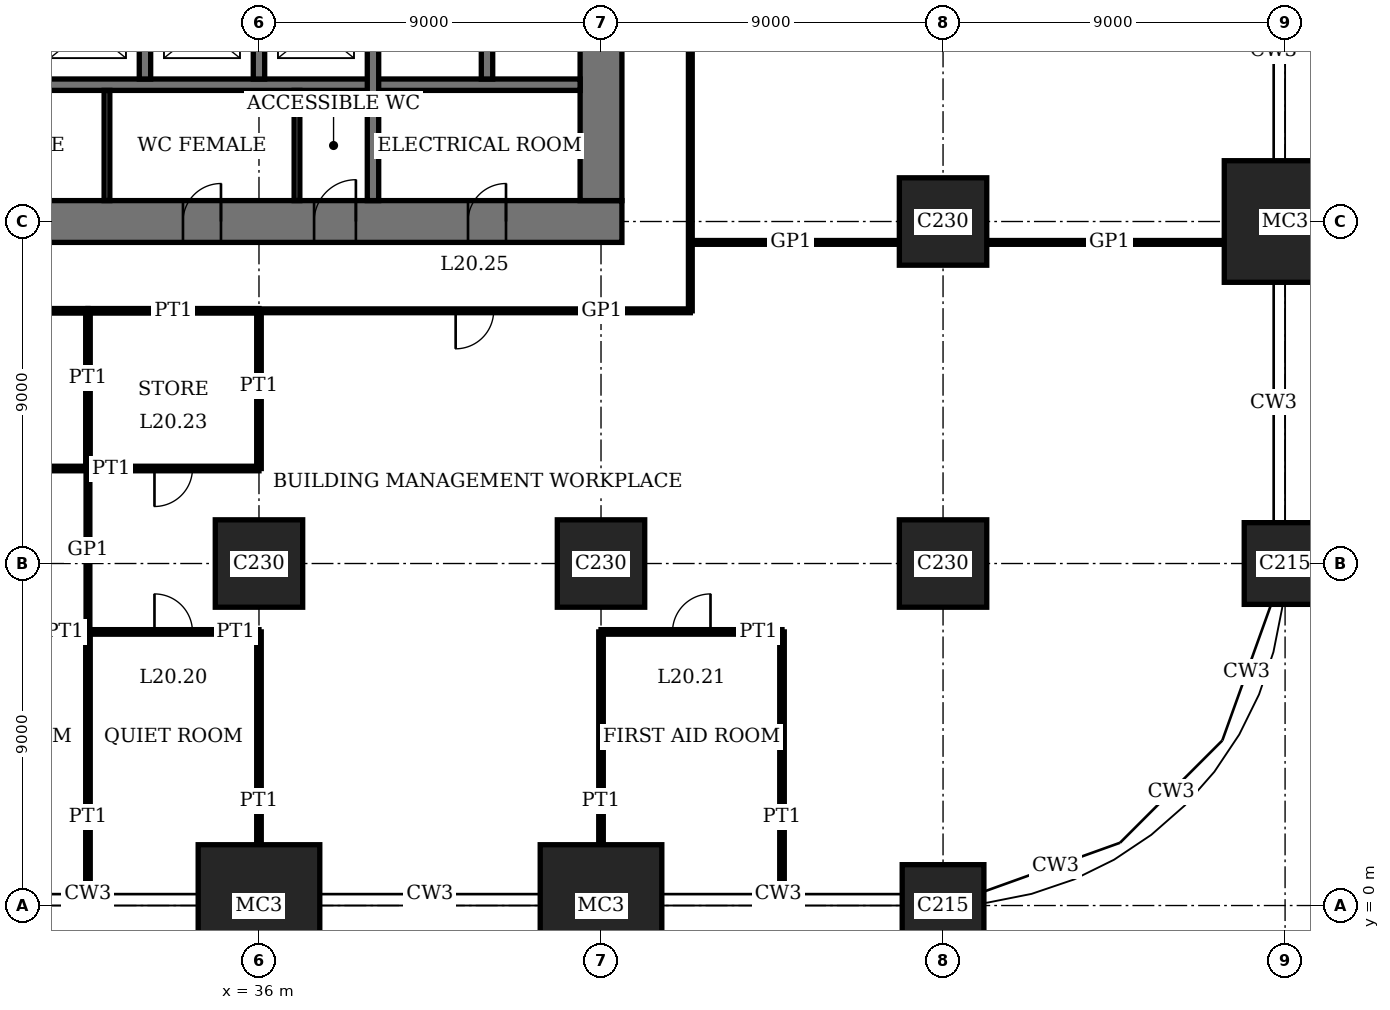
"""IFC4 building model, lengths in metres.
Left out: names, types, materials, properties, quantities, classifications, styles, units other than length and angle.
Written with IfcOpenShell. Run it as: python <this file> out.ifc"""

import sys

from ifc_helpers import new_model, si_unit, direction, frame, frame_2d, origin, origin_2d, place, context, subcontext, project, spatial, rectangle, extrude, element, fill, save


model = new_model("IFC4")
c1 = context("Model", 3, precision=1e-05, world=origin(), true_north=direction((0.0, 1.0)))
c2 = subcontext(c1, "Body", "Model", "MODEL_VIEW")
j1 = project(units=[si_unit("LENGTHUNIT", "METRE"), si_unit("PLANEANGLEUNIT", "RADIAN")], contexts=[c1])
p1 = place(None, origin())
s1 = spatial("IfcSite", under=j1, at=p1, CompositionType="ELEMENT")
p2 = place(p1, origin())
s2 = spatial("IfcBuilding", under=s1, at=p2, CompositionType="ELEMENT")
p3 = place(p2, frame((0.0, 0.0, 85.0)))
s3 = spatial("IfcBuildingStorey", under=s2, at=p3, CompositionType="ELEMENT", Elevation=85.0)
p4 = place(p3, frame((36.0, 0.0, 0.0), z_axis=(0.0, 0.0, 1.0), x_axis=(1.0, 0.0, 0.0)))
e1 = element("IfcColumn", 1, at=p4, inside=s3, PredefinedType="COLUMN", context=c2, shape_type="SweptSolid", body=[
    extrude(rectangle(XDim=3.2, YDim=3.2, at=origin_2d()), origin(), (0.0, 0.0, 1.0), 4.0),
])
p5 = place(p3, frame((36.0, 9.0, 0.0), z_axis=(0.0, 0.0, 1.0), x_axis=(1.0, 0.0, 0.0)))
e2 = element("IfcColumn", 2, at=p5, inside=s3, PredefinedType="COLUMN", context=c2, shape_type="SweptSolid", body=[
    extrude(rectangle(XDim=2.3, YDim=2.3, at=origin_2d()), origin(), (0.0, 0.0, 1.0), 4.0),
])
p6 = place(p3, frame((45.0, 0.0, 0.0), z_axis=(0.0, 0.0, 1.0), x_axis=(1.0, 0.0, 0.0)))
e3 = element("IfcColumn", 3, at=p6, inside=s3, PredefinedType="COLUMN", context=c2, shape_type="SweptSolid", body=[
    extrude(rectangle(XDim=3.2, YDim=3.2, at=origin_2d()), origin(), (0.0, 0.0, 1.0), 4.0),
])
p7 = place(p3, frame((45.0, 9.0, 0.0), z_axis=(0.0, 0.0, 1.0), x_axis=(1.0, 0.0, 0.0)))
e4 = element("IfcColumn", 4, at=p7, inside=s3, PredefinedType="COLUMN", context=c2, shape_type="SweptSolid", body=[
    extrude(rectangle(XDim=2.3, YDim=2.3, at=origin_2d()), origin(), (0.0, 0.0, 1.0), 4.0),
])
p8 = place(p3, frame((54.0, 0.0, 0.0), z_axis=(0.0, 0.0, 1.0), x_axis=(1.0, 0.0, 0.0)))
e5 = element("IfcColumn", 5, at=p8, inside=s3, PredefinedType="COLUMN", context=c2, shape_type="SweptSolid", body=[
    extrude(rectangle(XDim=2.15, YDim=2.15, at=origin_2d()), origin(), (0.0, 0.0, 1.0), 4.0),
])
for number, where, z_axis, x_axis in (
    (6, (54.0, 9.0, 0.0), (0.0, 0.0, 1.0), (1.0, 0.0, 0.0)),
    (7, (54.0, 18.0, 0.0), (0.0, 0.0, 1.0), (1.0, 0.0, 0.0)),
):
    element("IfcColumn", number, at=place(p3, frame(where, z_axis=z_axis, x_axis=x_axis)), inside=s3, PredefinedType="COLUMN", context=c2, shape_type="SweptSolid", body=[
        extrude(rectangle(XDim=2.3, YDim=2.3, at=origin_2d()), origin(), (0.0, 0.0, 1.0), 4.0),
    ])
p9 = place(p3, frame((63.0, 9.0, 0.0), z_axis=(0.0, 0.0, 1.0), x_axis=(1.0, 0.0, 0.0)))
e8 = element("IfcColumn", 8, at=p9, inside=s3, PredefinedType="COLUMN", context=c2, shape_type="SweptSolid", body=[
    extrude(rectangle(XDim=2.15, YDim=2.15, at=origin_2d()), origin(), (0.0, 0.0, 1.0), 4.0),
])
p10 = place(p3, frame((63.0, 18.0, 0.0), z_axis=(0.0, 0.0, 1.0), x_axis=(1.0, 0.0, 0.0)))
e9 = element("IfcColumn", 9, at=p10, inside=s3, PredefinedType="COLUMN", context=c2, shape_type="SweptSolid", body=[
    extrude(rectangle(XDim=3.2, YDim=3.2, at=origin_2d()), origin(), (0.0, 0.0, 1.0), 4.0),
])
p11 = place(p3, frame((17.45, 18.0, 0.0), z_axis=(0.0, 0.0, 1.0), x_axis=(1.0, 0.0, 0.0)))
e10 = element("IfcWall", 10, at=p11, inside=s3, PredefinedType="SHEAR", context=c2, shape_type="SweptSolid", body=[
    extrude(rectangle(XDim=28.1, YDim=1.1, at=frame_2d((14.05, 0.0))), origin(), (0.0, 0.0, 1.0), 4.0),
])
p12 = place(p11, frame((11.55, 0.0, 0.0)))
e11 = element("IfcOpeningElement", 11, at=p12, cuts=e10, PredefinedType="OPENING", context=c2, shape_type="SweptSolid", body=[
    extrude(rectangle(XDim=1.0, YDim=2.4, at=frame_2d((0.5, 1.2))), frame((0.0, 0.56, 0.0), z_axis=(0.0, -1.0, 0.0), x_axis=(1.0, 0.0, 0.0)), (0.0, 0.0, 1.0), 1.12),
])
p13 = place(p11, frame((16.55, 0.0, 0.0)))
e12 = element("IfcOpeningElement", 12, at=p13, cuts=e10, PredefinedType="OPENING", context=c2, shape_type="SweptSolid", body=[
    extrude(rectangle(XDim=1.0, YDim=2.4, at=frame_2d((0.5, 1.2))), frame((0.0, 0.56, 0.0), z_axis=(0.0, -1.0, 0.0), x_axis=(1.0, 0.0, 0.0)), (0.0, 0.0, 1.0), 1.12),
])
p14 = place(p11, frame((20.0, 0.0, 0.0)))
e13 = element("IfcOpeningElement", 13, at=p14, cuts=e10, PredefinedType="OPENING", context=c2, shape_type="SweptSolid", body=[
    extrude(rectangle(XDim=1.1, YDim=2.4, at=frame_2d((0.55, 1.2))), frame((0.0, 0.56, 0.0), z_axis=(0.0, -1.0, 0.0), x_axis=(1.0, 0.0, 0.0)), (0.0, 0.0, 1.0), 1.12),
])
p15 = place(p11, frame((24.05, 0.0, 0.0)))
e14 = element("IfcOpeningElement", 14, at=p15, cuts=e10, PredefinedType="OPENING", context=c2, shape_type="SweptSolid", body=[
    extrude(rectangle(XDim=1.0, YDim=2.4, at=frame_2d((0.5, 1.2))), frame((0.0, 0.56, 0.0), z_axis=(0.0, -1.0, 0.0), x_axis=(1.0, 0.0, 0.0)), (0.0, 0.0, 1.0), 1.12),
])
p16 = place(p3, frame((45.0, 18.55, 0.0), z_axis=(0.0, 0.0, 1.0), x_axis=(0.0, 1.0, 0.0)))
e15 = element("IfcWall", 15, at=p16, inside=s3, PredefinedType="SHEAR", context=c2, shape_type="SweptSolid", body=[
    extrude(rectangle(XDim=16.9, YDim=1.1, at=frame_2d((8.45, 0.0))), origin(), (0.0, 0.0, 1.0), 4.0),
])
p17 = place(p16, frame((8.9, 0.0, 0.0)))
e16 = element("IfcOpeningElement", 16, at=p17, cuts=e15, PredefinedType="OPENING", context=c2, shape_type="SweptSolid", body=[
    extrude(rectangle(XDim=1.8, YDim=2.4, at=frame_2d((0.9, 1.2))), frame((0.0, 0.56, 0.0), z_axis=(0.0, -1.0, 0.0), x_axis=(1.0, 0.0, 0.0)), (0.0, 0.0, 1.0), 1.12),
])
p18 = place(p3, frame((27.15, 21.6, 0.0), z_axis=(0.0, 0.0, 1.0), x_axis=(1.0, 0.0, 0.0)))
e17 = element("IfcWall", 17, at=p18, inside=s3, PredefinedType="SHEAR", context=c2, shape_type="SweptSolid", body=[
    extrude(rectangle(XDim=17.3, YDim=0.3, at=frame_2d((8.65, 0.0))), origin(), (0.0, 0.0, 1.0), 4.0),
])
for number, where, z_axis, x_axis in (
    (18, (33.0, 21.75, 0.0), (0.0, 0.0, 1.0), (0.0, 1.0, 0.0)),
    (19, (36.0, 21.75, 0.0), (0.0, 0.0, 1.0), (0.0, 1.0, 0.0)),
):
    element("IfcWall", number, at=place(p3, frame(where, z_axis=z_axis, x_axis=x_axis)), inside=s3, PredefinedType="SHEAR", context=c2, shape_type="SweptSolid", body=[
        extrude(rectangle(XDim=2.7, YDim=0.3, at=frame_2d((1.35, 0.0))), origin(), (0.0, 0.0, 1.0), 4.0),
    ])
p19 = place(p3, frame((39.0, 18.55, 0.0), z_axis=(0.0, 0.0, 1.0), x_axis=(0.0, 1.0, 0.0)))
e20 = element("IfcWall", 20, at=p19, inside=s3, PredefinedType="SHEAR", context=c2, shape_type="SweptSolid", body=[
    extrude(rectangle(XDim=5.9, YDim=0.3, at=frame_2d((2.95, 0.0))), origin(), (0.0, 0.0, 1.0), 4.0),
])
p20 = place(p3, frame((42.0, 21.75, 0.0), z_axis=(0.0, 0.0, 1.0), x_axis=(0.0, 1.0, 0.0)))
e21 = element("IfcWall", 21, at=p20, inside=s3, PredefinedType="SHEAR", context=c2, shape_type="SweptSolid", body=[
    extrude(rectangle(XDim=2.7, YDim=0.3, at=frame_2d((1.35, 0.0))), origin(), (0.0, 0.0, 1.0), 4.0),
])
p21 = place(p3, frame((27.0, 7.2, 0.0), z_axis=(0.0, 0.0, 1.0), x_axis=(1.0, 0.0, 0.0)))
e22 = element("IfcWall", 22, at=p21, inside=s3, PredefinedType="PARTITIONING", context=c2, shape_type="SweptSolid", body=[
    extrude(rectangle(XDim=4.5, YDim=0.12, at=frame_2d((2.25, 0.0))), origin(), (0.0, 0.0, 1.0), 3.75),
])
p22 = place(p21, frame((1.75, 0.0, 0.0)))
e23 = element("IfcOpeningElement", 23, at=p22, cuts=e22, PredefinedType="OPENING", context=c2, shape_type="SweptSolid", body=[
    extrude(rectangle(XDim=1.0, YDim=2.4, at=frame_2d((0.5, 1.2))), frame((0.0, 0.07, 0.0), z_axis=(0.0, -1.0, 0.0), x_axis=(1.0, 0.0, 0.0)), (0.0, 0.0, 1.0), 0.14),
])
p23 = place(p3, frame((31.5, 7.2, 0.0), z_axis=(0.0, 0.0, 1.0), x_axis=(1.0, 0.0, 0.0)))
e24 = element("IfcWall", 24, at=p23, inside=s3, PredefinedType="PARTITIONING", context=c2, shape_type="SweptSolid", body=[
    extrude(rectangle(XDim=4.5, YDim=0.12, at=frame_2d((2.25, 0.0))), origin(), (0.0, 0.0, 1.0), 3.75),
])
p24 = place(p23, frame((1.75, 0.0, 0.0)))
e25 = element("IfcOpeningElement", 25, at=p24, cuts=e24, PredefinedType="OPENING", context=c2, shape_type="SweptSolid", body=[
    extrude(rectangle(XDim=1.0, YDim=2.4, at=frame_2d((0.5, 1.2))), frame((0.0, 0.07, 0.0), z_axis=(0.0, -1.0, 0.0), x_axis=(1.0, 0.0, 0.0)), (0.0, 0.0, 1.0), 0.14),
])
p25 = place(p3, frame((45.0, 7.2, 0.0), z_axis=(0.0, 0.0, 1.0), x_axis=(1.0, 0.0, 0.0)))
e26 = element("IfcWall", 26, at=p25, inside=s3, PredefinedType="PARTITIONING", context=c2, shape_type="SweptSolid", body=[
    extrude(rectangle(XDim=4.762, YDim=0.12, at=frame_2d((2.381, 0.0))), origin(), (0.0, 0.0, 1.0), 3.75),
])
p26 = place(p25, frame((1.881, 0.0, 0.0)))
e27 = element("IfcOpeningElement", 27, at=p26, cuts=e26, PredefinedType="OPENING", context=c2, shape_type="SweptSolid", body=[
    extrude(rectangle(XDim=1.0, YDim=2.4, at=frame_2d((0.5, 1.2))), frame((0.0, 0.07, 0.0), z_axis=(0.0, -1.0, 0.0), x_axis=(1.0, 0.0, 0.0)), (0.0, 0.0, 1.0), 0.14),
])
p27 = place(p3, frame((22.5, 11.5, 0.0), z_axis=(0.0, 0.0, 1.0), x_axis=(1.0, 0.0, 0.0)))
e28 = element("IfcWall", 28, at=p27, inside=s3, PredefinedType="PARTITIONING", context=c2, shape_type="SweptSolid", body=[
    extrude(rectangle(XDim=9.0, YDim=0.12, at=frame_2d((4.5, 0.0))), origin(), (0.0, 0.0, 1.0), 3.75),
])
p28 = place(p27, frame((4.0, 0.0, 0.0)))
e29 = element("IfcOpeningElement", 29, at=p28, cuts=e28, PredefinedType="OPENING", context=c2, shape_type="SweptSolid", body=[
    extrude(rectangle(XDim=1.0, YDim=2.4, at=frame_2d((0.5, 1.2))), frame((0.0, 0.07, 0.0), z_axis=(0.0, -1.0, 0.0), x_axis=(1.0, 0.0, 0.0)), (0.0, 0.0, 1.0), 0.14),
])
p29 = place(p3, frame((31.5, 11.5, 0.0), z_axis=(0.0, 0.0, 1.0), x_axis=(1.0, 0.0, 0.0)))
e30 = element("IfcWall", 30, at=p29, inside=s3, PredefinedType="PARTITIONING", context=c2, shape_type="SweptSolid", body=[
    extrude(rectangle(XDim=4.5, YDim=0.12, at=frame_2d((2.25, 0.0))), origin(), (0.0, 0.0, 1.0), 3.75),
])
p30 = place(p29, frame((1.75, 0.0, 0.0)))
e31 = element("IfcOpeningElement", 31, at=p30, cuts=e30, PredefinedType="OPENING", context=c2, shape_type="SweptSolid", body=[
    extrude(rectangle(XDim=1.0, YDim=2.4, at=frame_2d((0.5, 1.2))), frame((0.0, 0.07, 0.0), z_axis=(0.0, -1.0, 0.0), x_axis=(1.0, 0.0, 0.0)), (0.0, 0.0, 1.0), 0.14),
])
p31 = place(p3, frame((22.5, 15.65, 0.0), z_axis=(0.0, 0.0, 1.0), x_axis=(1.0, 0.0, 0.0)))
e32 = element("IfcWall", 32, at=p31, inside=s3, PredefinedType="PARTITIONING", context=c2, shape_type="SweptSolid", body=[
    extrude(rectangle(XDim=9.0, YDim=0.12, at=frame_2d((4.5, 0.0))), origin(), (0.0, 0.0, 1.0), 3.75),
])
p32 = place(p3, frame((31.5, 15.65, 0.0), z_axis=(0.0, 0.0, 1.0), x_axis=(1.0, 0.0, 0.0)))
e33 = element("IfcWall", 33, at=p32, inside=s3, PredefinedType="PARTITIONING", context=c2, shape_type="SweptSolid", body=[
    extrude(rectangle(XDim=4.5, YDim=0.12, at=frame_2d((2.25, 0.0))), origin(), (0.0, 0.0, 1.0), 3.75),
])
p33 = place(p3, frame((36.0, 15.65, 0.0), z_axis=(0.0, 0.0, 1.0), x_axis=(1.0, 0.0, 0.0)))
e34 = element("IfcWall", 34, at=p33, inside=s3, PredefinedType="PARTITIONING", context=c2, shape_type="SweptSolid", body=[
    extrude(rectangle(XDim=11.35, YDim=0.1, at=frame_2d((5.675, 0.0))), origin(), (0.0, 0.0, 1.0), 3.75),
])
p34 = place(p33, frame((5.175, 0.0, 0.0)))
e35 = element("IfcOpeningElement", 35, at=p34, cuts=e34, PredefinedType="OPENING", context=c2, shape_type="SweptSolid", body=[
    extrude(rectangle(XDim=1.0, YDim=2.4, at=frame_2d((0.5, 1.2))), frame((0.0, 0.06, 0.0), z_axis=(0.0, -1.0, 0.0), x_axis=(1.0, 0.0, 0.0)), (0.0, 0.0, 1.0), 0.12),
])
p35 = place(p3, frame((47.35, 17.45, 0.0), z_axis=(0.0, 0.0, 1.0), x_axis=(1.0, 0.0, 0.0)))
e36 = element("IfcWall", 36, at=p35, inside=s3, PredefinedType="PARTITIONING", context=c2, shape_type="SweptSolid", body=[
    extrude(rectangle(XDim=5.5, YDim=0.1, at=frame_2d((2.75, 0.0))), origin(), (0.0, 0.0, 1.0), 3.75),
])
p36 = place(p3, frame((55.15, 17.45, 0.0), z_axis=(0.0, 0.0, 1.0), x_axis=(1.0, 0.0, 0.0)))
e37 = element("IfcWall", 37, at=p36, inside=s3, PredefinedType="PARTITIONING", context=c2, shape_type="SweptSolid", body=[
    extrude(rectangle(XDim=6.25, YDim=0.1, at=frame_2d((3.125, 0.0))), origin(), (0.0, 0.0, 1.0), 3.75),
])
p37 = place(p3, frame((31.5, 11.5, 0.0), z_axis=(0.0, 0.0, 1.0), x_axis=(0.0, 1.0, 0.0)))
e38 = element("IfcWall", 38, at=p37, inside=s3, PredefinedType="PARTITIONING", context=c2, shape_type="SweptSolid", body=[
    extrude(rectangle(XDim=4.15, YDim=0.12, at=frame_2d((2.075, 0.0))), origin(), (0.0, 0.0, 1.0), 3.75),
])
p38 = place(p3, frame((31.5, 0.31, 0.0), z_axis=(0.0, 0.0, 1.0), x_axis=(0.0, 1.0, 0.0)))
e39 = element("IfcWall", 39, at=p38, inside=s3, PredefinedType="PARTITIONING", context=c2, shape_type="SweptSolid", body=[
    extrude(rectangle(XDim=6.89, YDim=0.12, at=frame_2d((3.445, 0.0))), origin(), (0.0, 0.0, 1.0), 3.75),
])
p39 = place(p3, frame((31.5, 7.2, 0.0), z_axis=(0.0, 0.0, 1.0), x_axis=(0.0, 1.0, 0.0)))
e40 = element("IfcWall", 40, at=p39, inside=s3, PredefinedType="PARTITIONING", context=c2, shape_type="SweptSolid", body=[
    extrude(rectangle(XDim=4.3, YDim=0.1, at=frame_2d((2.15, 0.0))), origin(), (0.0, 0.0, 1.0), 3.75),
])
p40 = place(p3, frame((36.0, 11.5, 0.0), z_axis=(0.0, 0.0, 1.0), x_axis=(0.0, 1.0, 0.0)))
e41 = element("IfcWall", 41, at=p40, inside=s3, PredefinedType="PARTITIONING", context=c2, shape_type="SweptSolid", body=[
    extrude(rectangle(XDim=4.15, YDim=0.12, at=frame_2d((2.075, 0.0))), origin(), (0.0, 0.0, 1.0), 3.05),
])
for number, where, z_axis, x_axis in (
    (42, (36.0, 1.6, 0.0), (0.0, 0.0, 1.0), (0.0, 1.0, 0.0)),
    (43, (45.0, 1.6, 0.0), (0.0, 0.0, 1.0), (0.0, 1.0, 0.0)),
):
    element("IfcWall", number, at=place(p3, frame(where, z_axis=z_axis, x_axis=x_axis)), inside=s3, PredefinedType="PARTITIONING", context=c2, shape_type="SweptSolid", body=[
        extrude(rectangle(XDim=5.6, YDim=0.12, at=frame_2d((2.8, 0.0))), origin(), (0.0, 0.0, 1.0), 3.05),
    ])
p41 = place(p3, frame((47.35, 15.65, 0.0), z_axis=(0.0, 0.0, 1.0), x_axis=(0.0, 1.0, 0.0)))
e44 = element("IfcWall", 44, at=p41, inside=s3, PredefinedType="PARTITIONING", context=c2, shape_type="SweptSolid", body=[
    extrude(rectangle(XDim=20.9, YDim=0.1, at=frame_2d((10.45, 0.0))), origin(), (0.0, 0.0, 1.0), 3.75),
])
p42 = place(p41, frame((9.95, 0.0, 0.0)))
e45 = element("IfcOpeningElement", 45, at=p42, cuts=e44, PredefinedType="OPENING", context=c2, shape_type="SweptSolid", body=[
    extrude(rectangle(XDim=1.0, YDim=2.4, at=frame_2d((0.5, 1.2))), frame((0.0, 0.06, 0.0), z_axis=(0.0, -1.0, 0.0), x_axis=(1.0, 0.0, 0.0)), (0.0, 0.0, 1.0), 0.12),
])
p43 = place(p3, frame((49.762, 0.31, 0.0), z_axis=(0.0, 0.0, 1.0), x_axis=(0.0, 1.0, 0.0)))
e46 = element("IfcWall", 46, at=p43, inside=s3, PredefinedType="PARTITIONING", context=c2, shape_type="SweptSolid", body=[
    extrude(rectangle(XDim=6.89, YDim=0.12, at=frame_2d((3.445, 0.0))), origin(), (0.0, 0.0, 1.0), 3.75),
])
for number, where, z_axis, x_axis in (
    (47, (32.0, 18.55, 0.0), (0.0, 0.0, 1.0), (0.0, 1.0, 0.0)),
    (48, (37.0, 18.55, 0.0), (0.0, 0.0, 1.0), (0.0, 1.0, 0.0)),
):
    element("IfcWall", number, at=place(p3, frame(where, z_axis=z_axis, x_axis=x_axis)), inside=s3, PredefinedType="PARTITIONING", context=c2, shape_type="SweptSolid", body=[
        extrude(rectangle(XDim=2.9, YDim=0.15, at=frame_2d((1.45, 0.0))), origin(), (0.0, 0.0, 1.0), 3.75),
    ])
p44 = place(p13, origin())
e49 = element("IfcDoor", 49, at=p44, inside=s3, OperationType="SINGLE_SWING_LEFT", PredefinedType="DOOR", context=c2, shape_type="SweptSolid", body=[
    extrude(rectangle(XDim=1.0, YDim=2.4, at=frame_2d((0.5, 1.2))), frame((0.0, 0.025, 0.0), z_axis=(0.0, -1.0, 0.0), x_axis=(1.0, 0.0, 0.0)), (0.0, 0.0, 1.0), 0.05),
    extrude(rectangle(XDim=0.04, YDim=2.4, at=frame_2d((0.02, 1.2))), frame((0.0, 0.4, 0.0), z_axis=(0.0, -1.0, 0.0), x_axis=(1.0, 0.0, 0.0)), (0.0, 0.0, 1.0), 0.8),
    extrude(rectangle(XDim=0.04, YDim=2.4, at=frame_2d((0.98, 1.2))), frame((0.0, 0.4, 0.0), z_axis=(0.0, -1.0, 0.0), x_axis=(1.0, 0.0, 0.0)), (0.0, 0.0, 1.0), 0.8),
    extrude(rectangle(XDim=1.0, YDim=0.04, at=frame_2d((0.5, 2.38))), frame((0.0, 0.4, 0.0), z_axis=(0.0, -1.0, 0.0), x_axis=(1.0, 0.0, 0.0)), (0.0, 0.0, 1.0), 0.8),
])
fill(e12, e49)
p45 = place(p14, origin())
e50 = element("IfcDoor", 50, at=p45, inside=s3, OperationType="SINGLE_SWING_LEFT", PredefinedType="DOOR", context=c2, shape_type="SweptSolid", body=[
    extrude(rectangle(XDim=1.1, YDim=2.4, at=frame_2d((0.55, 1.2))), frame((0.0, 0.025, 0.0), z_axis=(0.0, -1.0, 0.0), x_axis=(1.0, 0.0, 0.0)), (0.0, 0.0, 1.0), 0.05),
    extrude(rectangle(XDim=0.04, YDim=2.4, at=frame_2d((0.02, 1.2))), frame((0.0, 0.44, 0.0), z_axis=(0.0, -1.0, 0.0), x_axis=(1.0, 0.0, 0.0)), (0.0, 0.0, 1.0), 0.88),
    extrude(rectangle(XDim=0.04, YDim=2.4, at=frame_2d((1.08, 1.2))), frame((0.0, 0.44, 0.0), z_axis=(0.0, -1.0, 0.0), x_axis=(1.0, 0.0, 0.0)), (0.0, 0.0, 1.0), 0.88),
    extrude(rectangle(XDim=1.1, YDim=0.04, at=frame_2d((0.55, 2.38))), frame((0.0, 0.44, 0.0), z_axis=(0.0, -1.0, 0.0), x_axis=(1.0, 0.0, 0.0)), (0.0, 0.0, 1.0), 0.88),
])
fill(e13, e50)
p46 = place(p15, origin())
e51 = element("IfcDoor", 51, at=p46, inside=s3, OperationType="SINGLE_SWING_LEFT", PredefinedType="DOOR", context=c2, shape_type="SweptSolid", body=[
    extrude(rectangle(XDim=1.0, YDim=2.4, at=frame_2d((0.5, 1.2))), frame((0.0, 0.025, 0.0), z_axis=(0.0, -1.0, 0.0), x_axis=(1.0, 0.0, 0.0)), (0.0, 0.0, 1.0), 0.05),
    extrude(rectangle(XDim=0.04, YDim=2.4, at=frame_2d((0.02, 1.2))), frame((0.0, 0.4, 0.0), z_axis=(0.0, -1.0, 0.0), x_axis=(1.0, 0.0, 0.0)), (0.0, 0.0, 1.0), 0.8),
    extrude(rectangle(XDim=0.04, YDim=2.4, at=frame_2d((0.98, 1.2))), frame((0.0, 0.4, 0.0), z_axis=(0.0, -1.0, 0.0), x_axis=(1.0, 0.0, 0.0)), (0.0, 0.0, 1.0), 0.8),
    extrude(rectangle(XDim=1.0, YDim=0.04, at=frame_2d((0.5, 2.38))), frame((0.0, 0.4, 0.0), z_axis=(0.0, -1.0, 0.0), x_axis=(1.0, 0.0, 0.0)), (0.0, 0.0, 1.0), 0.8),
])
fill(e14, e51)
p47 = place(p24, origin())
e52 = element("IfcDoor", 52, at=p47, inside=s3, OperationType="SINGLE_SWING_RIGHT", PredefinedType="DOOR", context=c2, shape_type="SweptSolid", body=[
    extrude(rectangle(XDim=1.0, YDim=2.4, at=frame_2d((0.5, 1.2))), frame((0.0, 0.025, 0.0), z_axis=(0.0, -1.0, 0.0), x_axis=(1.0, 0.0, 0.0)), (0.0, 0.0, 1.0), 0.05),
])
fill(e25, e52)
p48 = place(p26, origin())
e53 = element("IfcDoor", 53, at=p48, inside=s3, OperationType="SINGLE_SWING_LEFT", PredefinedType="DOOR", context=c2, shape_type="SweptSolid", body=[
    extrude(rectangle(XDim=1.0, YDim=2.4, at=frame_2d((0.5, 1.2))), frame((0.0, 0.025, 0.0), z_axis=(0.0, -1.0, 0.0), x_axis=(1.0, 0.0, 0.0)), (0.0, 0.0, 1.0), 0.05),
])
fill(e27, e53)
p49 = place(p30, origin())
e54 = element("IfcDoor", 54, at=p49, inside=s3, OperationType="SINGLE_SWING_LEFT", PredefinedType="DOOR", context=c2, shape_type="SweptSolid", body=[
    extrude(rectangle(XDim=1.0, YDim=2.4, at=frame_2d((0.5, 1.2))), frame((0.0, 0.025, 0.0), z_axis=(0.0, -1.0, 0.0), x_axis=(1.0, 0.0, 0.0)), (0.0, 0.0, 1.0), 0.05),
])
fill(e31, e54)
p50 = place(p34, origin())
e55 = element("IfcDoor", 55, at=p50, inside=s3, OperationType="SINGLE_SWING_LEFT", PredefinedType="DOOR", context=c2, shape_type="SweptSolid", body=[
    extrude(rectangle(XDim=1.0, YDim=2.4, at=frame_2d((0.5, 1.2))), frame((0.0, 0.02, 0.0), z_axis=(0.0, -1.0, 0.0), x_axis=(1.0, 0.0, 0.0)), (0.0, 0.0, 1.0), 0.04),
])
fill(e35, e55)
save(model, sys.argv[1])
